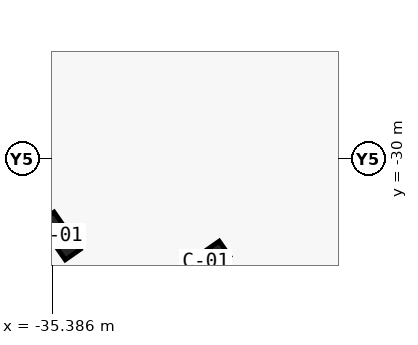
"""IFC4 building model, lengths in metres.
Left out: names, types, materials, properties, quantities, classifications, styles, units other than length and angle.
Written with IfcOpenShell. Run it as: python <this file> out.ifc"""

import sys

from ifc_helpers import new_model, si_unit, direction, frame, origin, origin_2d, place, context, subcontext, project, spatial, rectangle, extrude, element, save


model = new_model("IFC4")
c1 = context("Model", 3, precision=1e-05, world=origin(), true_north=direction((0.0, 1.0)))
c2 = subcontext(c1, "Body", "Model", "MODEL_VIEW")
j1 = project(units=[si_unit("LENGTHUNIT", "METRE"), si_unit("PLANEANGLEUNIT", "RADIAN")], contexts=[c1])
p1 = place(None, origin())
s1 = spatial("IfcSite", under=j1, at=p1, CompositionType="ELEMENT")
p2 = place(p1, origin())
s2 = spatial("IfcBuilding", under=s1, at=p2, CompositionType="ELEMENT")
p3 = place(p2, frame((0.0, 0.0, -4.5)))
s3 = spatial("IfcBuildingStorey", under=s2, at=p3, CompositionType="ELEMENT", Elevation=-4.5)
for number, where, z_axis, x_axis in (
    (1, (-30.336, -33.388, 0.0), (0.0, 0.0, 1.0), (-0.819, -0.574, 0.0)),
    (2, (-35.14, -32.541, 0.0), (0.0, 0.0, 1.0), (-0.574, 0.819, 0.0)),
):
    element("IfcColumn", number, at=place(p3, frame(where, z_axis=z_axis, x_axis=x_axis)), inside=s3, PredefinedType="COLUMN", context=c2, shape_type="SweptSolid", body=[
        extrude(rectangle(XDim=1.5, YDim=0.6, at=origin_2d()), origin(), (0.0, 0.0, 1.0), 4.5),
    ])
save(model, sys.argv[1])
